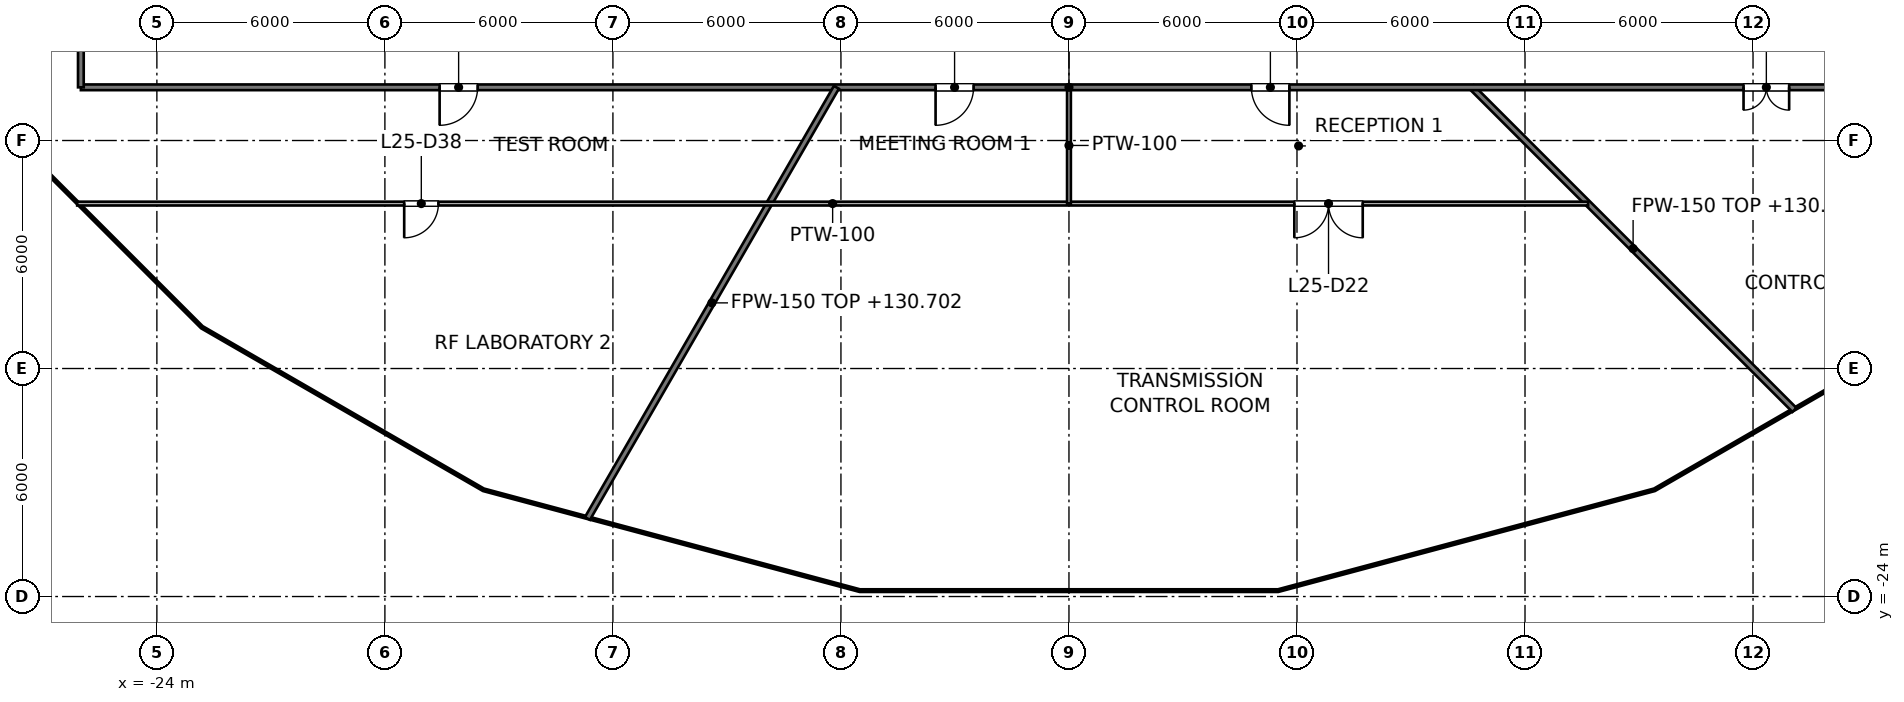
"""IFC4 building model, lengths in metres.
Left out: names, types, materials, properties, quantities, classifications, styles, units other than length and angle.
Written with IfcOpenShell. Run it as: python <this file> out.ifc"""

import sys

from ifc_helpers import new_model, si_unit, direction, frame, frame_2d, origin, place, context, subcontext, project, spatial, rectangle, extrude, element, fill, save


model = new_model("IFC4")
c1 = context("Model", 3, precision=1e-05, world=origin(), true_north=direction((0.0, 1.0)))
c2 = subcontext(c1, "Body", "Model", "MODEL_VIEW")
j1 = project(units=[si_unit("LENGTHUNIT", "METRE"), si_unit("PLANEANGLEUNIT", "RADIAN")], contexts=[c1])
p1 = place(None, origin())
s1 = spatial("IfcSite", under=j1, at=p1, CompositionType="ELEMENT")
p2 = place(p1, origin())
s2 = spatial("IfcBuilding", under=s1, at=p2, CompositionType="ELEMENT")
p3 = place(p2, frame((0.0, 0.0, 127.2)))
s3 = spatial("IfcBuildingStorey", under=s2, at=p3, CompositionType="ELEMENT", Elevation=127.2)
p4 = place(p3, frame((10.6, -10.6, 0.0), z_axis=(0.0, 0.0, 1.0), x_axis=(0.707106781187, -0.707106781187, 0.0)))
e1 = element("IfcWall", 1, at=p4, inside=s3, PredefinedType="PARTITIONING", context=c2, shape_type="SweptSolid", body=[
    extrude(rectangle(XDim=12.005, YDim=0.15, at=frame_2d((6.003, 0.0))), origin(), (0.0, 0.0, 1.0), 3.127),
])
p5 = place(p3, frame((-26.0, -10.6, 0.0), z_axis=(0.0, 0.0, 1.0), x_axis=(1.0, 0.0, 0.0)))
e2 = element("IfcWall", 2, at=p5, inside=s3, PredefinedType="PARTITIONING", context=c2, shape_type="SweptSolid", body=[
    extrude(rectangle(XDim=52.0, YDim=0.15, at=frame_2d((26.0, 0.0))), origin(), (0.0, 0.0, 1.0), 3.127),
])
p6 = place(p5, frame((22.49, 0.0, 0.0)))
e3 = element("IfcOpeningElement", 3, at=p6, cuts=e2, PredefinedType="OPENING", context=c2, shape_type="SweptSolid", body=[
    extrude(rectangle(XDim=1.0, YDim=2.1, at=frame_2d((0.5, 1.05))), frame((0.0, 0.075, 0.0), z_axis=(0.0, -1.0, 0.0), x_axis=(1.0, 0.0, 0.0)), (0.0, 0.0, 1.0), 0.15),
])
p7 = place(p5, frame((30.8, 0.0, 0.0)))
e4 = element("IfcOpeningElement", 4, at=p7, cuts=e2, PredefinedType="OPENING", context=c2, shape_type="SweptSolid", body=[
    extrude(rectangle(XDim=1.0, YDim=2.1, at=frame_2d((0.5, 1.05))), frame((0.0, 0.075, 0.0), z_axis=(0.0, -1.0, 0.0), x_axis=(1.0, 0.0, 0.0)), (0.0, 0.0, 1.0), 0.15),
])
p8 = place(p5, frame((43.75, 0.0, 0.0)))
e5 = element("IfcOpeningElement", 5, at=p8, cuts=e2, PredefinedType="OPENING", context=c2, shape_type="SweptSolid", body=[
    extrude(rectangle(XDim=1.2, YDim=2.1, at=frame_2d((0.6, 1.05))), frame((0.0, 0.075, 0.0), z_axis=(0.0, -1.0, 0.0), x_axis=(1.0, 0.0, 0.0)), (0.0, 0.0, 1.0), 0.15),
])
p9 = place(p5, frame((9.44, 0.0, 0.0)))
e6 = element("IfcOpeningElement", 6, at=p9, cuts=e2, PredefinedType="OPENING", context=c2, shape_type="SweptSolid", body=[
    extrude(rectangle(XDim=1.0, YDim=2.1, at=frame_2d((0.5, 1.05))), frame((0.0, 0.075, 0.0), z_axis=(0.0, -1.0, 0.0), x_axis=(1.0, 0.0, 0.0)), (0.0, 0.0, 1.0), 0.15),
])
p10 = place(p3, frame((-12.67, -21.945, 0.0), z_axis=(0.0, 0.0, 1.0), x_axis=(0.500015519518, 0.866016443401, 0.0)))
e7 = element("IfcWall", 7, at=p10, inside=s3, PredefinedType="PARTITIONING", context=c2, shape_type="SweptSolid", body=[
    extrude(rectangle(XDim=13.1, YDim=0.15, at=frame_2d((6.55, 0.0))), origin(), (0.0, 0.0, 1.0), 3.502),
])
p11 = place(p3, frame((-26.0, -10.6, 0.0), z_axis=(0.0, 0.0, 1.0), x_axis=(0.0, 1.0, 0.0)))
e8 = element("IfcWall", 8, at=p11, inside=s3, PredefinedType="PARTITIONING", context=c2, shape_type="SweptSolid", body=[
    extrude(rectangle(XDim=2.8, YDim=0.15, at=frame_2d((1.4, 0.0))), origin(), (0.0, 0.0, 1.0), 3.195),
])
p12 = place(p3, frame((-26.097, -13.66, 0.0), z_axis=(0.0, 0.0, 1.0), x_axis=(1.0, 0.0, 0.0)))
e9 = element("IfcWall", 9, at=p12, inside=s3, PredefinedType="PARTITIONING", context=c2, shape_type="SweptSolid", body=[
    extrude(rectangle(XDim=39.757, YDim=0.1, at=frame_2d((19.878, 0.0))), origin(), (0.0, 0.0, 1.0), 3.127),
])
p13 = place(p12, frame((32.027, 0.0, 0.0)))
e10 = element("IfcOpeningElement", 10, at=p13, cuts=e9, PredefinedType="OPENING", context=c2, shape_type="SweptSolid", body=[
    extrude(rectangle(XDim=1.8, YDim=2.1, at=frame_2d((0.9, 1.05))), frame((0.0, 0.05, 0.0), z_axis=(0.0, -1.0, 0.0), x_axis=(1.0, 0.0, 0.0)), (0.0, 0.0, 1.0), 0.1),
])
p14 = place(p12, frame((8.605, 0.0, 0.0)))
e11 = element("IfcOpeningElement", 11, at=p14, cuts=e9, PredefinedType="OPENING", context=c2, shape_type="SweptSolid", body=[
    extrude(rectangle(XDim=0.9, YDim=2.1, at=frame_2d((0.45, 1.05))), frame((0.0, 0.05, 0.0), z_axis=(0.0, -1.0, 0.0), x_axis=(1.0, 0.0, 0.0)), (0.0, 0.0, 1.0), 0.1),
])
p15 = place(p3, frame((0.0, -13.66, 0.0), z_axis=(0.0, 0.0, 1.0), x_axis=(0.0, 1.0, 0.0)))
e12 = element("IfcWall", 12, at=p15, inside=s3, PredefinedType="PARTITIONING", context=c2, shape_type="SweptSolid", body=[
    extrude(rectangle(XDim=3.06, YDim=0.1, at=frame_2d((1.53, 0.0))), origin(), (0.0, 0.0, 1.0), 3.127),
])
p16 = place(p6, origin())
e13 = element("IfcDoor", 13, at=p16, inside=s3, OperationType="SINGLE_SWING_LEFT", PredefinedType="DOOR", context=c2, shape_type="SweptSolid", body=[
    extrude(rectangle(XDim=1.0, YDim=2.1, at=frame_2d((0.5, 1.05))), frame((0.0, 0.025, 0.0), z_axis=(0.0, -1.0, 0.0), x_axis=(1.0, 0.0, 0.0)), (0.0, 0.0, 1.0), 0.05),
])
fill(e3, e13)
p17 = place(p7, origin())
e14 = element("IfcDoor", 14, at=p17, inside=s3, OperationType="SINGLE_SWING_RIGHT", PredefinedType="DOOR", context=c2, shape_type="SweptSolid", body=[
    extrude(rectangle(XDim=1.0, YDim=2.1, at=frame_2d((0.5, 1.05))), frame((0.0, 0.025, 0.0), z_axis=(0.0, -1.0, 0.0), x_axis=(1.0, 0.0, 0.0)), (0.0, 0.0, 1.0), 0.05),
])
fill(e4, e14)
p18 = place(p13, origin())
e15 = element("IfcDoor", 15, at=p18, inside=s3, OperationType="DOUBLE_DOOR_SINGLE_SWING", PredefinedType="DOOR", context=c2, shape_type="SweptSolid", body=[
    extrude(rectangle(XDim=1.8, YDim=2.1, at=frame_2d((0.9, 1.05))), frame((0.0, 0.025, 0.0), z_axis=(0.0, -1.0, 0.0), x_axis=(1.0, 0.0, 0.0)), (0.0, 0.0, 1.0), 0.05),
])
fill(e10, e15)
p19 = place(p8, origin())
e16 = element("IfcDoor", 16, at=p19, inside=s3, OperationType="DOUBLE_DOOR_SINGLE_SWING", PredefinedType="DOOR", context=c2, shape_type="SweptSolid", body=[
    extrude(rectangle(XDim=1.2, YDim=2.1, at=frame_2d((0.6, 1.05))), frame((0.0, 0.025, 0.0), z_axis=(0.0, -1.0, 0.0), x_axis=(1.0, 0.0, 0.0)), (0.0, 0.0, 1.0), 0.05),
])
fill(e5, e16)
p20 = place(p9, origin())
e17 = element("IfcDoor", 17, at=p20, inside=s3, OperationType="SINGLE_SWING_LEFT", PredefinedType="DOOR", context=c2, shape_type="SweptSolid", body=[
    extrude(rectangle(XDim=1.0, YDim=2.1, at=frame_2d((0.5, 1.05))), frame((0.0, 0.025, 0.0), z_axis=(0.0, -1.0, 0.0), x_axis=(1.0, 0.0, 0.0)), (0.0, 0.0, 1.0), 0.05),
])
fill(e6, e17)
p21 = place(p14, origin())
e18 = element("IfcDoor", 18, at=p21, inside=s3, OperationType="SINGLE_SWING_LEFT", PredefinedType="DOOR", context=c2, shape_type="SweptSolid", body=[
    extrude(rectangle(XDim=0.9, YDim=2.1, at=frame_2d((0.45, 1.05))), frame((0.0, 0.025, 0.0), z_axis=(0.0, -1.0, 0.0), x_axis=(1.0, 0.0, 0.0)), (0.0, 0.0, 1.0), 0.05),
])
fill(e11, e18)
save(model, sys.argv[1])
